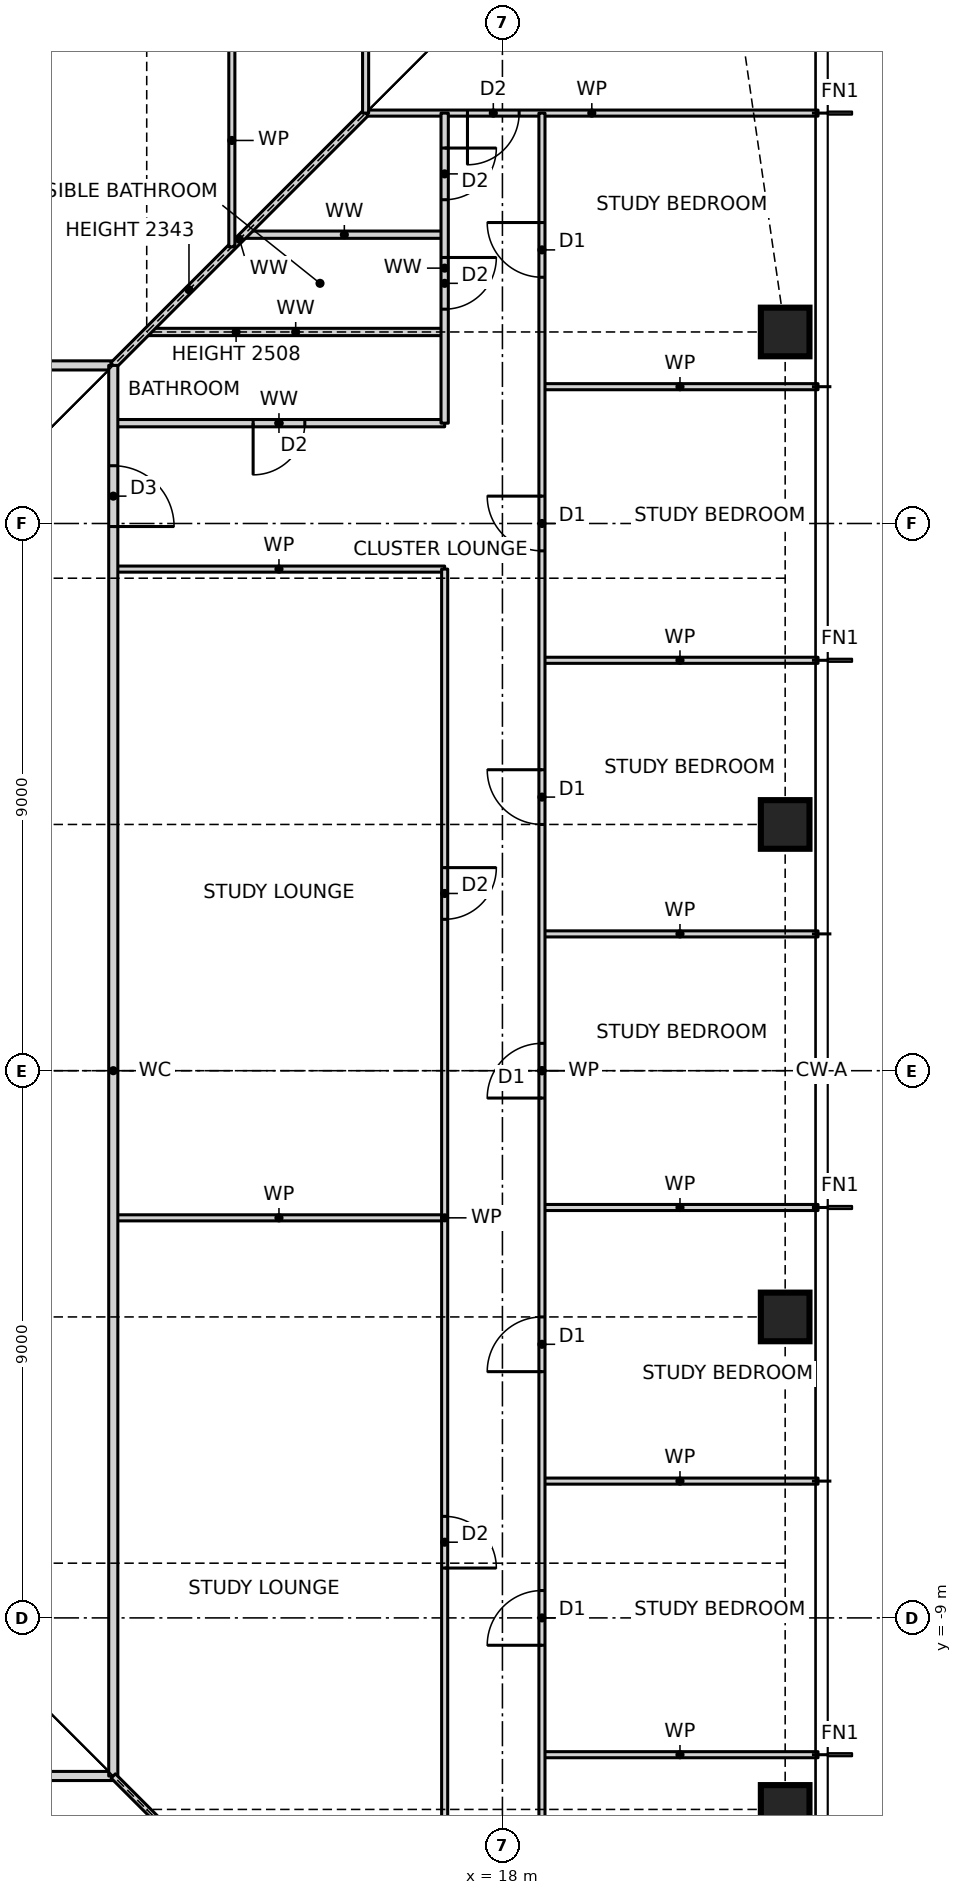
"""IFC4 building model, lengths in metres.
Left out: names, types, materials, properties, quantities, classifications, styles, units other than length and angle.
Written with IfcOpenShell. Run it as: python <this file> out.ifc"""

import sys

from ifc_helpers import new_model, si_unit, direction, frame, frame_2d, origin, origin_2d, place, context, subcontext, project, spatial, rectangle, hollow_rectangle, extrude, element, fill, save


model = new_model("IFC4")
c1 = context("Model", 3, precision=1e-05, world=origin(), true_north=direction((0.0, 1.0)))
c2 = subcontext(c1, "Body", "Model", "MODEL_VIEW")
j1 = project(units=[si_unit("LENGTHUNIT", "METRE"), si_unit("PLANEANGLEUNIT", "RADIAN")], contexts=[c1])
p1 = place(None, origin())
s1 = spatial("IfcSite", under=j1, at=p1, CompositionType="ELEMENT")
p2 = place(p1, origin())
s2 = spatial("IfcBuilding", under=s1, at=p2, CompositionType="ELEMENT")
p3 = place(p2, frame((0.0, 0.0, 53.5)))
s3 = spatial("IfcBuildingStorey", under=s2, at=p3, CompositionType="ELEMENT", Elevation=53.5)
for number, where, z_axis, x_axis in (
    (1, (22.65, -12.15, 0.0), (0.0, 0.0, 1.0), (1.0, 0.0, 0.0)),
    (2, (22.65, -4.05, 0.0), (0.0, 0.0, 1.0), (1.0, 0.0, 0.0)),
    (3, (22.65, 4.05, 0.0), (0.0, 0.0, 1.0), (1.0, 0.0, 0.0)),
    (4, (22.65, 12.15, 0.0), (0.0, 0.0, 1.0), (1.0, 0.0, 0.0)),
):
    element("IfcColumn", number, at=place(p3, frame(where, z_axis=z_axis, x_axis=x_axis)), inside=s3, PredefinedType="COLUMN", context=c2, shape_type="SweptSolid", body=[
        extrude(hollow_rectangle(XDim=0.8, YDim=0.8, WallThickness=0.09, at=origin_2d()), origin(), (0.0, 0.0, 1.0), 3.5),
    ])
p4 = place(p3, frame((-12.6, -11.6, 0.0), z_axis=(0.0, 0.0, 1.0), x_axis=(1.0, 0.0, 0.0)))
e5 = element("IfcWall", 5, at=p4, inside=s3, PredefinedType="PARTITIONING", context=c2, shape_type="SweptSolid", body=[
    extrude(rectangle(XDim=24.2, YDim=0.15, at=frame_2d((12.1, 0.0))), origin(), (0.0, 0.0, 1.0), 3.27),
])
p5 = place(p4, frame((1.74, 0.0, 0.0)))
e6 = element("IfcOpeningElement", 6, at=p5, cuts=e5, PredefinedType="OPENING", context=c2, shape_type="SweptSolid", body=[
    extrude(rectangle(XDim=1.0, YDim=2.1, at=frame_2d((0.5, 1.05))), frame((0.0, 0.085, 0.0), z_axis=(0.0, -1.0, 0.0), x_axis=(1.0, 0.0, 0.0)), (0.0, 0.0, 1.0), 0.17),
])
p6 = place(p4, frame((22.025, 0.0, 0.0)))
e7 = element("IfcOpeningElement", 7, at=p6, cuts=e5, PredefinedType="OPENING", context=c2, shape_type="SweptSolid", body=[
    extrude(rectangle(XDim=1.0, YDim=2.1, at=frame_2d((0.5, 1.05))), frame((0.0, 0.085, 0.0), z_axis=(0.0, -1.0, 0.0), x_axis=(1.0, 0.0, 0.0)), (0.0, 0.0, 1.0), 0.17),
])
for number, where, z_axis, x_axis in (
    (8, (18.65, -11.25, 0.0), (0.0, 0.0, 1.0), (1.0, 0.0, 0.0)),
    (9, (18.65, -6.75, 0.0), (0.0, 0.0, 1.0), (1.0, 0.0, 0.0)),
):
    element("IfcWall", number, at=place(p3, frame(where, z_axis=z_axis, x_axis=x_axis)), inside=s3, PredefinedType="PARTITIONING", context=c2, shape_type="SweptSolid", body=[
        extrude(rectangle(XDim=4.54, YDim=0.1, at=frame_2d((2.27, 0.0))), origin(), (0.0, 0.0, 1.0), 3.27),
    ])
p7 = place(p3, frame((11.6, -2.42, 0.0), z_axis=(0.0, 0.0, 1.0), x_axis=(1.0, 0.0, 0.0)))
e10 = element("IfcWall", 10, at=p7, inside=s3, PredefinedType="PARTITIONING", context=c2, shape_type="SweptSolid", body=[
    extrude(rectangle(XDim=5.45, YDim=0.1, at=frame_2d((2.725, 0.0))), origin(), (0.0, 0.0, 1.0), 3.27),
])
for number, where, z_axis, x_axis in (
    (11, (18.65, -2.25, 0.0), (0.0, 0.0, 1.0), (1.0, 0.0, 0.0)),
    (12, (18.65, 2.25, 0.0), (0.0, 0.0, 1.0), (1.0, 0.0, 0.0)),
    (13, (18.65, 6.75, 0.0), (0.0, 0.0, 1.0), (1.0, 0.0, 0.0)),
):
    element("IfcWall", number, at=place(p3, frame(where, z_axis=z_axis, x_axis=x_axis)), inside=s3, PredefinedType="PARTITIONING", context=c2, shape_type="SweptSolid", body=[
        extrude(rectangle(XDim=4.54, YDim=0.1, at=frame_2d((2.27, 0.0))), origin(), (0.0, 0.0, 1.0), 3.27),
    ])
p8 = place(p3, frame((11.6, 8.25, 0.0), z_axis=(0.0, 0.0, 1.0), x_axis=(1.0, 0.0, 0.0)))
e14 = element("IfcWall", 14, at=p8, inside=s3, PredefinedType="PARTITIONING", context=c2, shape_type="SweptSolid", body=[
    extrude(rectangle(XDim=5.45, YDim=0.1, at=frame_2d((2.725, 0.0))), origin(), (0.0, 0.0, 1.0), 3.27),
])
p9 = place(p3, frame((11.6, 10.65, 0.0), z_axis=(0.0, 0.0, 1.0), x_axis=(1.0, 0.0, 0.0)))
e15 = element("IfcWall", 15, at=p9, inside=s3, PredefinedType="PARTITIONING", context=c2, shape_type="SweptSolid", body=[
    extrude(rectangle(XDim=5.45, YDim=0.12, at=frame_2d((2.725, 0.0))), origin(), (0.0, 0.0, 1.0), 3.27),
])
p10 = place(p9, frame((2.3, 0.0, 0.0)))
e16 = element("IfcOpeningElement", 16, at=p10, cuts=e15, PredefinedType="OPENING", context=c2, shape_type="SweptSolid", body=[
    extrude(rectangle(XDim=0.85, YDim=2.1, at=frame_2d((0.425, 1.05))), frame((0.0, 0.07, 0.0), z_axis=(0.0, -1.0, 0.0), x_axis=(1.0, 0.0, 0.0)), (0.0, 0.0, 1.0), 0.14),
])
p11 = place(p3, frame((18.65, 11.25, 0.0), z_axis=(0.0, 0.0, 1.0), x_axis=(1.0, 0.0, 0.0)))
e17 = element("IfcWall", 17, at=p11, inside=s3, PredefinedType="PARTITIONING", context=c2, shape_type="SweptSolid", body=[
    extrude(rectangle(XDim=4.54, YDim=0.1, at=frame_2d((2.27, 0.0))), origin(), (0.0, 0.0, 1.0), 3.27),
])
p12 = place(p3, frame((-12.6, 11.6, 0.0), z_axis=(0.0, 0.0, 1.0), x_axis=(1.0, 0.0, 0.0)))
e18 = element("IfcWall", 18, at=p12, inside=s3, PredefinedType="PARTITIONING", context=c2, shape_type="SweptSolid", body=[
    extrude(rectangle(XDim=24.2, YDim=0.15, at=frame_2d((12.1, 0.0))), origin(), (0.0, 0.0, 1.0), 3.27),
])
p13 = place(p12, frame((8.95, 0.0, 0.0)))
e19 = element("IfcOpeningElement", 19, at=p13, cuts=e18, PredefinedType="OPENING", context=c2, shape_type="SweptSolid", body=[
    extrude(rectangle(XDim=1.0, YDim=2.1, at=frame_2d((0.5, 1.05))), frame((0.0, 0.085, 0.0), z_axis=(0.0, -1.0, 0.0), x_axis=(1.0, 0.0, 0.0)), (0.0, 0.0, 1.0), 0.17),
])
p14 = place(p12, frame((6.9, 0.0, 0.0)))
e20 = element("IfcOpeningElement", 20, at=p14, cuts=e18, PredefinedType="OPENING", context=c2, shape_type="SweptSolid", body=[
    extrude(rectangle(XDim=0.9, YDim=2.1, at=frame_2d((0.45, 1.05))), frame((0.0, 0.085, 0.0), z_axis=(0.0, -1.0, 0.0), x_axis=(1.0, 0.0, 0.0)), (0.0, 0.0, 1.0), 0.17),
])
p15 = place(p3, frame((12.15, 12.15, 0.0), z_axis=(0.0, 0.0, 1.0), x_axis=(1.0, 0.0, 0.0)))
e21 = element("IfcWall", 21, at=p15, inside=s3, PredefinedType="PARTITIONING", context=c2, shape_type="SweptSolid", body=[
    extrude(rectangle(XDim=4.9, YDim=0.12, at=frame_2d((2.45, 0.0))), origin(), (0.0, 0.0, 1.0), 2.508),
])
p16 = place(p3, frame((13.75, 13.75, 0.0), z_axis=(0.0, 0.0, 1.0), x_axis=(1.0, 0.0, 0.0)))
e22 = element("IfcWall", 22, at=p16, inside=s3, PredefinedType="PARTITIONING", context=c2, shape_type="SweptSolid", body=[
    extrude(rectangle(XDim=3.3, YDim=0.12, at=frame_2d((1.65, 0.0))), origin(), (0.0, 0.0, 1.0), 3.27),
])
p17 = place(p3, frame((15.75, 15.75, 0.0), z_axis=(0.0, 0.0, 1.0), x_axis=(1.0, 0.0, 0.0)))
e23 = element("IfcWall", 23, at=p17, inside=s3, PredefinedType="PARTITIONING", context=c2, shape_type="SweptSolid", body=[
    extrude(rectangle(XDim=7.44, YDim=0.1, at=frame_2d((3.72, 0.0))), origin(), (0.0, 0.0, 1.0), 3.27),
])
p18 = place(p17, frame((1.675, 0.0, 0.0)))
e24 = element("IfcOpeningElement", 24, at=p18, cuts=e23, PredefinedType="OPENING", context=c2, shape_type="SweptSolid", body=[
    extrude(rectangle(XDim=0.85, YDim=2.1, at=frame_2d((0.425, 1.05))), frame((0.0, 0.06, 0.0), z_axis=(0.0, -1.0, 0.0), x_axis=(1.0, 0.0, 0.0)), (0.0, 0.0, 1.0), 0.12),
])
p19 = place(p3, frame((11.6, 11.6, 0.0), z_axis=(0.0, 0.0, 1.0), x_axis=(0.707106781187, 0.707106781187, 0.0)))
e25 = element("IfcWall", 25, at=p19, inside=s3, PredefinedType="PARTITIONING", context=c2, shape_type="SweptSolid", body=[
    extrude(rectangle(XDim=5.869, YDim=0.12, at=frame_2d((2.935, 0.0))), origin(), (0.0, 0.0, 1.0), 2.343),
])
p20 = place(p3, frame((18.65, -15.75, 0.0), z_axis=(0.0, 0.0, 1.0), x_axis=(0.0, 1.0, 0.0)))
e26 = element("IfcWall", 26, at=p20, inside=s3, PredefinedType="PARTITIONING", context=c2, shape_type="SweptSolid", body=[
    extrude(rectangle(XDim=31.5, YDim=0.1, at=frame_2d((15.75, 0.0))), origin(), (0.0, 0.0, 1.0), 3.27),
])
p21 = place(p20, frame((1.8, 0.0, 0.0)))
e27 = element("IfcOpeningElement", 27, at=p21, cuts=e26, PredefinedType="OPENING", context=c2, shape_type="SweptSolid", body=[
    extrude(rectangle(XDim=0.9, YDim=2.1, at=frame_2d((0.45, 1.05))), frame((0.0, 0.06, 0.0), z_axis=(0.0, -1.0, 0.0), x_axis=(1.0, 0.0, 0.0)), (0.0, 0.0, 1.0), 0.12),
])
p22 = place(p20, frame((6.3, 0.0, 0.0)))
e28 = element("IfcOpeningElement", 28, at=p22, cuts=e26, PredefinedType="OPENING", context=c2, shape_type="SweptSolid", body=[
    extrude(rectangle(XDim=0.9, YDim=2.1, at=frame_2d((0.45, 1.05))), frame((0.0, 0.06, 0.0), z_axis=(0.0, -1.0, 0.0), x_axis=(1.0, 0.0, 0.0)), (0.0, 0.0, 1.0), 0.12),
])
p23 = place(p20, frame((10.8, 0.0, 0.0)))
e29 = element("IfcOpeningElement", 29, at=p23, cuts=e26, PredefinedType="OPENING", context=c2, shape_type="SweptSolid", body=[
    extrude(rectangle(XDim=0.9, YDim=2.1, at=frame_2d((0.45, 1.05))), frame((0.0, 0.06, 0.0), z_axis=(0.0, -1.0, 0.0), x_axis=(1.0, 0.0, 0.0)), (0.0, 0.0, 1.0), 0.12),
])
p24 = place(p20, frame((15.3, 0.0, 0.0)))
e30 = element("IfcOpeningElement", 30, at=p24, cuts=e26, PredefinedType="OPENING", context=c2, shape_type="SweptSolid", body=[
    extrude(rectangle(XDim=0.9, YDim=2.1, at=frame_2d((0.45, 1.05))), frame((0.0, 0.06, 0.0), z_axis=(0.0, -1.0, 0.0), x_axis=(1.0, 0.0, 0.0)), (0.0, 0.0, 1.0), 0.12),
])
p25 = place(p20, frame((19.8, 0.0, 0.0)))
e31 = element("IfcOpeningElement", 31, at=p25, cuts=e26, PredefinedType="OPENING", context=c2, shape_type="SweptSolid", body=[
    extrude(rectangle(XDim=0.9, YDim=2.1, at=frame_2d((0.45, 1.05))), frame((0.0, 0.06, 0.0), z_axis=(0.0, -1.0, 0.0), x_axis=(1.0, 0.0, 0.0)), (0.0, 0.0, 1.0), 0.12),
])
p26 = place(p20, frame((24.3, 0.0, 0.0)))
e32 = element("IfcOpeningElement", 32, at=p26, cuts=e26, PredefinedType="OPENING", context=c2, shape_type="SweptSolid", body=[
    extrude(rectangle(XDim=0.9, YDim=2.1, at=frame_2d((0.45, 1.05))), frame((0.0, 0.06, 0.0), z_axis=(0.0, -1.0, 0.0), x_axis=(1.0, 0.0, 0.0)), (0.0, 0.0, 1.0), 0.12),
])
p27 = place(p20, frame((28.8, 0.0, 0.0)))
e33 = element("IfcOpeningElement", 33, at=p27, cuts=e26, PredefinedType="OPENING", context=c2, shape_type="SweptSolid", body=[
    extrude(rectangle(XDim=0.9, YDim=2.1, at=frame_2d((0.45, 1.05))), frame((0.0, 0.06, 0.0), z_axis=(0.0, -1.0, 0.0), x_axis=(1.0, 0.0, 0.0)), (0.0, 0.0, 1.0), 0.12),
])
p28 = place(p3, frame((17.05, -13.09, 0.0), z_axis=(0.0, 0.0, 1.0), x_axis=(0.0, 1.0, 0.0)))
e34 = element("IfcWall", 34, at=p28, inside=s3, PredefinedType="PARTITIONING", context=c2, shape_type="SweptSolid", body=[
    extrude(rectangle(XDim=21.34, YDim=0.1, at=frame_2d((10.67, 0.0))), origin(), (0.0, 0.0, 1.0), 3.27),
])
p29 = place(p28, frame((4.91, 0.0, 0.0)))
e35 = element("IfcOpeningElement", 35, at=p29, cuts=e34, PredefinedType="OPENING", context=c2, shape_type="SweptSolid", body=[
    extrude(rectangle(XDim=0.85, YDim=2.1, at=frame_2d((0.425, 1.05))), frame((0.0, 0.06, 0.0), z_axis=(0.0, -1.0, 0.0), x_axis=(1.0, 0.0, 0.0)), (0.0, 0.0, 1.0), 0.12),
])
p30 = place(p28, frame((15.58, 0.0, 0.0)))
e36 = element("IfcOpeningElement", 36, at=p30, cuts=e34, PredefinedType="OPENING", context=c2, shape_type="SweptSolid", body=[
    extrude(rectangle(XDim=0.85, YDim=2.1, at=frame_2d((0.425, 1.05))), frame((0.0, 0.06, 0.0), z_axis=(0.0, -1.0, 0.0), x_axis=(1.0, 0.0, 0.0)), (0.0, 0.0, 1.0), 0.12),
])
p31 = place(p3, frame((17.05, 10.65, 0.0), z_axis=(0.0, 0.0, 1.0), x_axis=(0.0, 1.0, 0.0)))
e37 = element("IfcWall", 37, at=p31, inside=s3, PredefinedType="PARTITIONING", context=c2, shape_type="SweptSolid", body=[
    extrude(rectangle(XDim=5.1, YDim=0.12, at=frame_2d((2.55, 0.0))), origin(), (0.0, 0.0, 1.0), 3.27),
])
p32 = place(p31, frame((1.875, 0.0, 0.0)))
e38 = element("IfcOpeningElement", 38, at=p32, cuts=e37, PredefinedType="OPENING", context=c2, shape_type="SweptSolid", body=[
    extrude(rectangle(XDim=0.85, YDim=2.1, at=frame_2d((0.425, 1.05))), frame((0.0, 0.07, 0.0), z_axis=(0.0, -1.0, 0.0), x_axis=(1.0, 0.0, 0.0)), (0.0, 0.0, 1.0), 0.14),
])
p33 = place(p31, frame((3.675, 0.0, 0.0)))
e39 = element("IfcOpeningElement", 39, at=p33, cuts=e37, PredefinedType="OPENING", context=c2, shape_type="SweptSolid", body=[
    extrude(rectangle(XDim=0.85, YDim=2.1, at=frame_2d((0.425, 1.05))), frame((0.0, 0.07, 0.0), z_axis=(0.0, -1.0, 0.0), x_axis=(1.0, 0.0, 0.0)), (0.0, 0.0, 1.0), 0.14),
])
p34 = place(p3, frame((15.75, 15.75, 0.0), z_axis=(0.0, 0.0, 1.0), x_axis=(0.0, 1.0, 0.0)))
e40 = element("IfcWall", 40, at=p34, inside=s3, PredefinedType="PARTITIONING", context=c2, shape_type="SweptSolid", body=[
    extrude(rectangle(XDim=7.44, YDim=0.1, at=frame_2d((3.72, 0.0))), origin(), (0.0, 0.0, 1.0), 3.27),
])
p35 = place(p3, frame((13.55, 13.55, 0.0), z_axis=(0.0, 0.0, 1.0), x_axis=(0.0, 1.0, 0.0)))
e41 = element("IfcWall", 41, at=p35, inside=s3, PredefinedType="PARTITIONING", context=c2, shape_type="SweptSolid", body=[
    extrude(rectangle(XDim=3.5, YDim=0.1, at=frame_2d((1.75, 0.0))), origin(), (0.0, 0.0, 1.0), 3.27),
])
p36 = place(p3, frame((11.6, -11.6, 0.0), z_axis=(0.0, 0.0, 1.0), x_axis=(0.0, 1.0, 0.0)))
e42 = element("IfcWall", 42, at=p36, inside=s3, PredefinedType="PARTITIONING", context=c2, shape_type="SweptSolid", body=[
    extrude(rectangle(XDim=23.2, YDim=0.15, at=frame_2d((11.6, 0.0))), origin(), (0.0, 0.0, 1.0), 3.27),
])
p37 = place(p36, frame((20.55, 0.0, 0.0)))
e43 = element("IfcOpeningElement", 43, at=p37, cuts=e42, PredefinedType="OPENING", context=c2, shape_type="SweptSolid", body=[
    extrude(rectangle(XDim=1.0, YDim=2.1, at=frame_2d((0.5, 1.05))), frame((0.0, 0.085, 0.0), z_axis=(0.0, -1.0, 0.0), x_axis=(1.0, 0.0, 0.0)), (0.0, 0.0, 1.0), 0.17),
])
p38 = place(p3, frame((15.75, -15.75, 0.0), z_axis=(0.0, 0.0, 1.0), x_axis=(-0.707106781187, 0.707106781187, 0.0)))
e44 = element("IfcWall", 44, at=p38, inside=s3, PredefinedType="PARTITIONING", context=c2, shape_type="SweptSolid", body=[
    extrude(rectangle(XDim=5.869, YDim=0.1, at=frame_2d((2.935, 0.0))), origin(), (0.0, 0.0, 1.0), 2.343),
])
p39 = place(p22, origin())
e45 = element("IfcDoor", 45, at=p39, inside=s3, OperationType="SINGLE_SWING_LEFT", PredefinedType="DOOR", context=c2, shape_type="SweptSolid", body=[
    extrude(rectangle(XDim=0.9, YDim=2.1, at=frame_2d((0.45, 1.05))), frame((0.0, 0.025, 0.0), z_axis=(0.0, -1.0, 0.0), x_axis=(1.0, 0.0, 0.0)), (0.0, 0.0, 1.0), 0.05),
])
fill(e28, e45)
p40 = place(p23, origin())
e46 = element("IfcDoor", 46, at=p40, inside=s3, OperationType="SINGLE_SWING_LEFT", PredefinedType="DOOR", context=c2, shape_type="SweptSolid", body=[
    extrude(rectangle(XDim=0.9, YDim=2.1, at=frame_2d((0.45, 1.05))), frame((0.0, 0.025, 0.0), z_axis=(0.0, -1.0, 0.0), x_axis=(1.0, 0.0, 0.0)), (0.0, 0.0, 1.0), 0.05),
])
fill(e29, e46)
p41 = place(p24, origin())
e47 = element("IfcDoor", 47, at=p41, inside=s3, OperationType="SINGLE_SWING_LEFT", PredefinedType="DOOR", context=c2, shape_type="SweptSolid", body=[
    extrude(rectangle(XDim=0.9, YDim=2.1, at=frame_2d((0.45, 1.05))), frame((0.0, 0.025, 0.0), z_axis=(0.0, -1.0, 0.0), x_axis=(1.0, 0.0, 0.0)), (0.0, 0.0, 1.0), 0.05),
])
fill(e30, e47)
p42 = place(p25, origin())
e48 = element("IfcDoor", 48, at=p42, inside=s3, OperationType="SINGLE_SWING_RIGHT", PredefinedType="DOOR", context=c2, shape_type="SweptSolid", body=[
    extrude(rectangle(XDim=0.9, YDim=2.1, at=frame_2d((0.45, 1.05))), frame((0.0, 0.025, 0.0), z_axis=(0.0, -1.0, 0.0), x_axis=(1.0, 0.0, 0.0)), (0.0, 0.0, 1.0), 0.05),
])
fill(e31, e48)
p43 = place(p26, origin())
e49 = element("IfcDoor", 49, at=p43, inside=s3, OperationType="SINGLE_SWING_RIGHT", PredefinedType="DOOR", context=c2, shape_type="SweptSolid", body=[
    extrude(rectangle(XDim=0.9, YDim=2.1, at=frame_2d((0.45, 1.05))), frame((0.0, 0.025, 0.0), z_axis=(0.0, -1.0, 0.0), x_axis=(1.0, 0.0, 0.0)), (0.0, 0.0, 1.0), 0.05),
])
fill(e32, e49)
p44 = place(p27, origin())
e50 = element("IfcDoor", 50, at=p44, inside=s3, OperationType="SINGLE_SWING_RIGHT", PredefinedType="DOOR", context=c2, shape_type="SweptSolid", body=[
    extrude(rectangle(XDim=0.9, YDim=2.1, at=frame_2d((0.45, 1.05))), frame((0.0, 0.025, 0.0), z_axis=(0.0, -1.0, 0.0), x_axis=(1.0, 0.0, 0.0)), (0.0, 0.0, 1.0), 0.05),
])
fill(e33, e50)
p45 = place(p37, frame((1.0, 0.0, 0.0), z_axis=(0.0, 0.0, 1.0), x_axis=(-1.0, 0.0, 0.0)))
e51 = element("IfcDoor", 51, at=p45, inside=s3, OperationType="SINGLE_SWING_RIGHT", PredefinedType="DOOR", context=c2, shape_type="SweptSolid", body=[
    extrude(rectangle(XDim=1.0, YDim=2.1, at=frame_2d((0.5, 1.05))), frame((0.0, 0.025, 0.0), z_axis=(0.0, -1.0, 0.0), x_axis=(1.0, 0.0, 0.0)), (0.0, 0.0, 1.0), 0.05),
])
fill(e43, e51)
p46 = place(p29, frame((0.85, 0.0, 0.0), z_axis=(0.0, 0.0, 1.0), x_axis=(-1.0, 0.0, 0.0)))
e52 = element("IfcDoor", 52, at=p46, inside=s3, OperationType="SINGLE_SWING_RIGHT", PredefinedType="DOOR", context=c2, shape_type="SweptSolid", body=[
    extrude(rectangle(XDim=0.85, YDim=2.1, at=frame_2d((0.425, 1.05))), frame((0.0, 0.025, 0.0), z_axis=(0.0, -1.0, 0.0), x_axis=(1.0, 0.0, 0.0)), (0.0, 0.0, 1.0), 0.05),
])
fill(e35, e52)
p47 = place(p30, frame((0.85, 0.0, 0.0), z_axis=(0.0, 0.0, 1.0), x_axis=(-1.0, 0.0, 0.0)))
e53 = element("IfcDoor", 53, at=p47, inside=s3, OperationType="SINGLE_SWING_LEFT", PredefinedType="DOOR", context=c2, shape_type="SweptSolid", body=[
    extrude(rectangle(XDim=0.85, YDim=2.1, at=frame_2d((0.425, 1.05))), frame((0.0, 0.025, 0.0), z_axis=(0.0, -1.0, 0.0), x_axis=(1.0, 0.0, 0.0)), (0.0, 0.0, 1.0), 0.05),
])
fill(e36, e53)
p48 = place(p10, frame((0.85, 0.0, 0.0), z_axis=(0.0, 0.0, 1.0), x_axis=(-1.0, 0.0, 0.0)))
e54 = element("IfcDoor", 54, at=p48, inside=s3, OperationType="SINGLE_SWING_RIGHT", PredefinedType="DOOR", context=c2, shape_type="SweptSolid", body=[
    extrude(rectangle(XDim=0.85, YDim=2.1, at=frame_2d((0.425, 1.05))), frame((0.0, 0.025, 0.0), z_axis=(0.0, -1.0, 0.0), x_axis=(1.0, 0.0, 0.0)), (0.0, 0.0, 1.0), 0.05),
])
fill(e16, e54)
p49 = place(p32, frame((0.85, 0.0, 0.0), z_axis=(0.0, 0.0, 1.0), x_axis=(-1.0, 0.0, 0.0)))
e55 = element("IfcDoor", 55, at=p49, inside=s3, OperationType="SINGLE_SWING_LEFT", PredefinedType="DOOR", context=c2, shape_type="SweptSolid", body=[
    extrude(rectangle(XDim=0.85, YDim=2.1, at=frame_2d((0.425, 1.05))), frame((0.0, 0.025, 0.0), z_axis=(0.0, -1.0, 0.0), x_axis=(1.0, 0.0, 0.0)), (0.0, 0.0, 1.0), 0.05),
])
fill(e38, e55)
p50 = place(p33, frame((0.85, 0.0, 0.0), z_axis=(0.0, 0.0, 1.0), x_axis=(-1.0, 0.0, 0.0)))
e56 = element("IfcDoor", 56, at=p50, inside=s3, OperationType="SINGLE_SWING_LEFT", PredefinedType="DOOR", context=c2, shape_type="SweptSolid", body=[
    extrude(rectangle(XDim=0.85, YDim=2.1, at=frame_2d((0.425, 1.05))), frame((0.0, 0.025, 0.0), z_axis=(0.0, -1.0, 0.0), x_axis=(1.0, 0.0, 0.0)), (0.0, 0.0, 1.0), 0.05),
])
fill(e39, e56)
p51 = place(p18, frame((0.85, 0.0, 0.0), z_axis=(0.0, 0.0, 1.0), x_axis=(-1.0, 0.0, 0.0)))
e57 = element("IfcDoor", 57, at=p51, inside=s3, OperationType="SINGLE_SWING_RIGHT", PredefinedType="DOOR", context=c2, shape_type="SweptSolid", body=[
    extrude(rectangle(XDim=0.85, YDim=2.1, at=frame_2d((0.425, 1.05))), frame((0.0, 0.025, 0.0), z_axis=(0.0, -1.0, 0.0), x_axis=(1.0, 0.0, 0.0)), (0.0, 0.0, 1.0), 0.05),
])
fill(e24, e57)
save(model, sys.argv[1])
